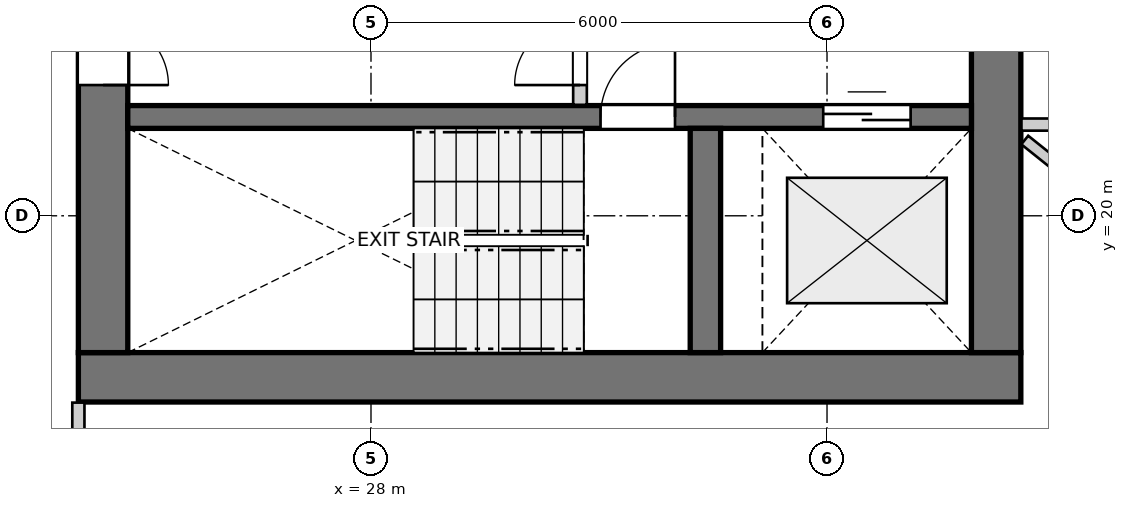
"""IFC4 building model, lengths in metres.
Left out: names, types, materials, properties, quantities, classifications, styles, units other than length and angle.
Written with IfcOpenShell. Run it as: python <this file> out.ifc"""

import sys

from ifc_helpers import new_model, si_unit, direction, frame, frame_2d, origin, place, context, subcontext, project, spatial, rectangle, extrude, source, transform, mapped, element, fill, save


model = new_model("IFC4")
c1 = context("Model", 3, precision=1e-05, world=origin(), true_north=direction((0.0, 1.0)))
c2 = subcontext(c1, "Body", "Model", "MODEL_VIEW")
j1 = project(units=[si_unit("LENGTHUNIT", "METRE"), si_unit("PLANEANGLEUNIT", "RADIAN")], contexts=[c1])
p1 = place(None, origin())
s1 = spatial("IfcSite", under=j1, at=p1, CompositionType="ELEMENT")
p2 = place(p1, origin())
s2 = spatial("IfcBuilding", under=s1, at=p2, CompositionType="ELEMENT")
p3 = place(p2, frame((0.0, 0.0, 136.2)))
s3 = spatial("IfcBuildingStorey", under=s2, at=p3, CompositionType="ELEMENT", Elevation=136.2)
p4 = place(p3, frame((24.15, 17.875, 0.0), z_axis=(0.0, 0.0, 1.0), x_axis=(1.0, 0.0, 0.0)))
e1 = element("IfcWall", 1, at=p4, inside=s3, PredefinedType="SHEAR", context=c2, shape_type="SweptSolid", body=[
    extrude(rectangle(XDim=12.4, YDim=0.65, at=frame_2d((6.2, 0.0))), origin(), (0.0, 0.0, 1.0), 2.95),
])
p5 = place(p3, frame((24.475, 33.8, 0.0), z_axis=(0.0, 0.0, 1.0), x_axis=(0.0, -1.0, 0.0)))
e2 = element("IfcWall", 2, at=p5, inside=s3, PredefinedType="SHEAR", context=c2, shape_type="SweptSolid", body=[
    extrude(rectangle(XDim=15.6, YDim=0.65, at=frame_2d((7.8, 0.0))), origin(), (0.0, 0.0, 1.0), 2.95),
])
p6 = place(p5, frame((7.05, 0.0, 0.0)))
e3 = element("IfcOpeningElement", 3, at=p6, cuts=e2, PredefinedType="OPENING", context=c2, shape_type="SweptSolid", body=[
    extrude(rectangle(XDim=1.5, YDim=2.15, at=frame_2d((0.75, 1.075))), frame((0.0, 0.335, 0.0), z_axis=(0.0, -1.0, 0.0), x_axis=(1.0, 0.0, 0.0)), (0.0, 0.0, 1.0), 0.67),
])
p7 = place(p5, frame((3.52, 0.0, 0.0)))
e4 = element("IfcOpeningElement", 4, at=p7, cuts=e2, PredefinedType="OPENING", context=c2, shape_type="SweptSolid", body=[
    extrude(rectangle(XDim=0.86, YDim=2.05, at=frame_2d((0.43, 1.025))), frame((0.0, 0.335, 0.0), z_axis=(0.0, -1.0, 0.0), x_axis=(1.0, 0.0, 0.0)), (0.0, 0.0, 1.0), 0.67),
])
p8 = place(p5, frame((11.22, 0.0, 0.0)))
e5 = element("IfcOpeningElement", 5, at=p8, cuts=e2, PredefinedType="OPENING", context=c2, shape_type="SweptSolid", body=[
    extrude(rectangle(XDim=0.86, YDim=2.05, at=frame_2d((0.43, 1.025))), frame((0.0, 0.335, 0.0), z_axis=(0.0, -1.0, 0.0), x_axis=(1.0, 0.0, 0.0)), (0.0, 0.0, 1.0), 0.67),
])
p9 = place(p3, frame((36.225, 18.2, 0.0), z_axis=(0.0, 0.0, 1.0), x_axis=(0.0, 1.0, 0.0)))
e6 = element("IfcWall", 6, at=p9, inside=s3, PredefinedType="SHEAR", context=c2, shape_type="SweptSolid", body=[
    extrude(rectangle(XDim=15.6, YDim=0.65, at=frame_2d((7.8, 0.0))), origin(), (0.0, 0.0, 1.0), 2.95),
])
p10 = place(p9, frame((4.25, 0.0, 0.0)))
e7 = element("IfcOpeningElement", 7, at=p10, cuts=e6, PredefinedType="OPENING", context=c2, shape_type="SweptSolid", body=[
    extrude(rectangle(XDim=1.1, YDim=2.15, at=frame_2d((0.55, 1.075))), frame((0.0, 0.335, 0.0), z_axis=(0.0, -1.0, 0.0), x_axis=(1.0, 0.0, 0.0)), (0.0, 0.0, 1.0), 0.67),
])
p11 = place(p9, frame((10.25, 0.0, 0.0)))
e8 = element("IfcOpeningElement", 8, at=p11, cuts=e6, PredefinedType="OPENING", context=c2, shape_type="SweptSolid", body=[
    extrude(rectangle(XDim=1.1, YDim=2.15, at=frame_2d((0.55, 1.075))), frame((0.0, 0.335, 0.0), z_axis=(0.0, -1.0, 0.0), x_axis=(1.0, 0.0, 0.0)), (0.0, 0.0, 1.0), 0.67),
])
p12 = place(p3, frame((24.8, 21.3, 0.0), z_axis=(0.0, 0.0, 1.0), x_axis=(1.0, 0.0, 0.0)))
e9 = element("IfcWall", 9, at=p12, inside=s3, PredefinedType="SHEAR", context=c2, shape_type="SweptSolid", body=[
    extrude(rectangle(XDim=11.1, YDim=0.3, at=frame_2d((5.55, 0.0))), origin(), (0.0, 0.0, 1.0), 2.95),
])
p13 = place(p12, frame((6.22, 0.0, 0.0)))
e10 = element("IfcOpeningElement", 10, at=p13, cuts=e9, PredefinedType="OPENING", context=c2, shape_type="SweptSolid", body=[
    extrude(rectangle(XDim=0.98, YDim=2.15, at=frame_2d((0.49, 1.075))), frame((0.0, 0.16, 0.0), z_axis=(0.0, -1.0, 0.0), x_axis=(1.0, 0.0, 0.0)), (0.0, 0.0, 1.0), 0.32),
])
p14 = place(p12, frame((9.15, 0.0, 0.0)))
e11 = element("IfcOpeningElement", 11, at=p14, cuts=e9, PredefinedType="OPENING", context=c2, shape_type="SweptSolid", body=[
    extrude(rectangle(XDim=1.15, YDim=2.15, at=frame_2d((0.575, 1.075))), frame((0.0, 0.16, 0.0), z_axis=(0.0, -1.0, 0.0), x_axis=(1.0, 0.0, 0.0)), (0.0, 0.0, 1.0), 0.32),
])
p15 = place(p3, frame((32.4, 18.2, 0.0), z_axis=(0.0, 0.0, 1.0), x_axis=(0.0, 1.0, 0.0)))
e12 = element("IfcWall", 12, at=p15, inside=s3, PredefinedType="SHEAR", context=c2, shape_type="SweptSolid", body=[
    extrude(rectangle(XDim=2.95, YDim=0.4, at=frame_2d((1.475, 0.0))), origin(), (0.0, 0.0, 1.0), 2.95),
])
p16 = place(p3, frame((30.75, 21.46, 0.0), z_axis=(0.0, 0.0, 1.0), x_axis=(0.0, 1.0, 0.0)))
e13 = element("IfcWall", 13, at=p16, inside=s3, PredefinedType="PARTITIONING", context=c2, shape_type="SweptSolid", body=[
    extrude(rectangle(XDim=3.11, YDim=0.18, at=frame_2d((1.555, 0.0))), origin(), (0.0, 0.0, 1.0), 2.95),
])
p17 = place(p16, frame((0.26, 0.0, 0.0)))
e14 = element("IfcOpeningElement", 14, at=p17, cuts=e13, PredefinedType="OPENING", context=c2, shape_type="SweptSolid", body=[
    extrude(rectangle(XDim=0.86, YDim=2.05, at=frame_2d((0.43, 1.025))), frame((0.0, 0.1, 0.0), z_axis=(0.0, -1.0, 0.0), x_axis=(1.0, 0.0, 0.0)), (0.0, 0.0, 1.0), 0.2),
])
p18 = place(p3, frame((36.602, 20.997, 0.0), z_axis=(0.0, 0.0, 1.0), x_axis=(0.780696683128, -0.624910144703, 0.0)))
e15 = element("IfcWall", 15, at=p18, inside=s3, PredefinedType="PARTITIONING", context=c2, shape_type="SweptSolid", body=[
    extrude(rectangle(XDim=7.474, YDim=0.145, at=frame_2d((3.737, 0.0))), origin(), (0.0, 0.0, 1.0), 2.95),
])
p19 = place(p3, frame((24.15, 13.516, 0.0), z_axis=(0.0, 0.0, 1.0), x_axis=(0.0, 1.0, 0.0)))
e16 = element("IfcWall", 16, at=p19, inside=s3, PredefinedType="PARTITIONING", context=c2, shape_type="SweptSolid", body=[
    extrude(rectangle(XDim=4.026, YDim=0.16, at=frame_2d((2.013, 0.0))), origin(), (0.0, 0.0, 1.0), 2.95),
])
p20 = place(p3, frame((36.558, 21.2, 0.0), z_axis=(0.0, 0.0, 1.0), x_axis=(1.0, 0.0, 0.0)))
e17 = element("IfcWall", 17, at=p20, inside=s3, PredefinedType="PARTITIONING", context=c2, shape_type="SweptSolid", body=[
    extrude(rectangle(XDim=1.684, YDim=0.16, at=frame_2d((0.842, 0.0))), origin(), (0.0, 0.0, 1.0), 2.95),
])
m1 = source(origin(), c2, "Body", "SweptSolid", [
    extrude(rectangle(XDim=0.98, YDim=2.15, at=frame_2d((0.49, 1.075))), frame((0.0, 0.025, 0.0), z_axis=(0.0, -1.0, 0.0), x_axis=(1.0, 0.0, 0.0)), (0.0, 0.0, 1.0), 0.05),
])
p21 = place(p13, origin())
e18 = element("IfcDoor", 18, at=p21, inside=s3, OperationType="SINGLE_SWING_RIGHT", PredefinedType="DOOR", context=c2, shape_type="MappedRepresentation", body=[
    mapped(m1, transform((0.0, 0.0, 0.0), x_axis=(1.0, 0.0, 0.0), y_axis=(0.0, 1.0, 0.0), z_axis=(0.0, 0.0, 1.0), scale=1.0)),
])
fill(e10, e18)
m2 = source(origin(), c2, "Body", "SweptSolid", [
    extrude(rectangle(XDim=1.15, YDim=2.15, at=frame_2d((0.575, 1.075))), frame((0.0, 0.025, 0.0), z_axis=(0.0, -1.0, 0.0), x_axis=(1.0, 0.0, 0.0)), (0.0, 0.0, 1.0), 0.05),
])
p22 = place(p14, origin())
e19 = element("IfcDoor", 19, at=p22, inside=s3, OperationType="DOUBLE_DOOR_SLIDING", PredefinedType="DOOR", context=c2, shape_type="MappedRepresentation", body=[
    mapped(m2, transform((0.0, 0.0, 0.0), x_axis=(1.0, 0.0, 0.0), y_axis=(0.0, 1.0, 0.0), z_axis=(0.0, 0.0, 1.0), scale=1.0)),
])
fill(e11, e19)
m3 = source(origin(), c2, "Body", "SweptSolid", [
    extrude(rectangle(XDim=0.86, YDim=2.05, at=frame_2d((0.43, 1.025))), frame((0.0, 0.025, 0.0), z_axis=(0.0, -1.0, 0.0), x_axis=(1.0, 0.0, 0.0)), (0.0, 0.0, 1.0), 0.05),
])
p23 = place(p8, origin())
e20 = element("IfcDoor", 20, at=p23, inside=s3, OperationType="SINGLE_SWING_RIGHT", PredefinedType="DOOR", context=c2, shape_type="MappedRepresentation", body=[
    mapped(m3, transform((0.0, 0.0, 0.0), x_axis=(1.0, 0.0, 0.0), y_axis=(0.0, 1.0, 0.0), z_axis=(0.0, 0.0, 1.0), scale=1.0)),
])
fill(e5, e20)
p24 = place(p17, origin())
e21 = element("IfcDoor", 21, at=p24, inside=s3, OperationType="SINGLE_SWING_LEFT", PredefinedType="DOOR", context=c2, shape_type="MappedRepresentation", body=[
    mapped(m3, transform((0.0, 0.0, 0.0), x_axis=(1.0, 0.0, 0.0), y_axis=(0.0, 1.0, 0.0), z_axis=(0.0, 0.0, 1.0), scale=1.0)),
])
fill(e14, e21)
save(model, sys.argv[1])
